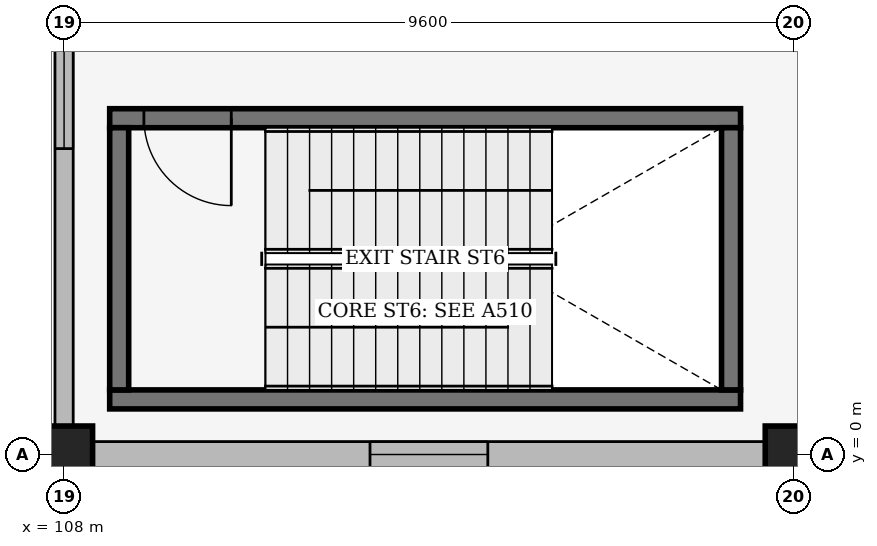
"""IFC4 building model, lengths in metres.
Left out: names, types, materials, properties, quantities, classifications, styles, units other than length and angle.
Written with IfcOpenShell. Run it as: python <this file> out.ifc"""

import sys

from ifc_helpers import new_model, si_unit, direction, frame, frame_2d, origin, origin_2d, place, context, subcontext, project, spatial, rectangle, extrude, element, fill, save


model = new_model("IFC4")
c1 = context("Model", 3, precision=1e-05, world=origin(), true_north=direction((0.0, 1.0)))
c2 = subcontext(c1, "Body", "Model", "MODEL_VIEW")
j1 = project(units=[si_unit("LENGTHUNIT", "METRE"), si_unit("PLANEANGLEUNIT", "RADIAN")], contexts=[c1])
p1 = place(None, origin())
s1 = spatial("IfcSite", under=j1, at=p1, CompositionType="ELEMENT")
p2 = place(p1, origin())
s2 = spatial("IfcBuilding", under=s1, at=p2, CompositionType="ELEMENT")
p3 = place(p2, frame((0.0, 0.0, 5.4)))
s3 = spatial("IfcBuildingStorey", under=s2, at=p3, CompositionType="ELEMENT", Elevation=5.4)
for number, where, z_axis, x_axis in (
    (1, (108.0, 0.0, 0.0), (0.0, 0.0, 1.0), (1.0, 0.0, 0.0)),
    (2, (117.6, 0.0, 0.0), (0.0, 0.0, 1.0), (1.0, 0.0, 0.0)),
):
    element("IfcColumn", number, at=place(p3, frame(where, z_axis=z_axis, x_axis=x_axis)), inside=s3, PredefinedType="COLUMN", context=c2, shape_type="SweptSolid", body=[
        extrude(rectangle(XDim=0.75, YDim=0.75, at=origin_2d()), origin(), (0.0, 0.0, 1.0), 5.1),
    ])
p4 = place(p3, frame((108.0, 9.217, 0.0), z_axis=(0.0, 0.0, 1.0), x_axis=(0.0, -1.0, 0.0)))
e3 = element("IfcWall", 3, at=p4, inside=s3, PredefinedType="SOLIDWALL", context=c2, shape_type="SweptSolid", body=[
    extrude(rectangle(XDim=8.834, YDim=0.24, at=frame_2d((4.417, 0.0))), origin(), (0.0, 0.0, 1.0), 4.406),
])
p5 = place(p4, frame((3.642, 0.0, 0.95)))
e4 = element("IfcOpeningElement", 4, at=p5, cuts=e3, PredefinedType="OPENING", context=c2, shape_type="SweptSolid", body=[
    extrude(rectangle(XDim=1.55, YDim=1.8, at=frame_2d((0.775, 0.9))), frame((0.0, 0.13, 0.0), z_axis=(0.0, -1.0, 0.0), x_axis=(1.0, 0.0, 0.0)), (0.0, 0.0, 1.0), 0.26),
])
p6 = place(p3, frame((108.383, 0.0, 0.0), z_axis=(0.0, 0.0, 1.0), x_axis=(1.0, 0.0, 0.0)))
e5 = element("IfcWall", 5, at=p6, inside=s3, PredefinedType="SOLIDWALL", context=c2, shape_type="SweptSolid", body=[
    extrude(rectangle(XDim=8.834, YDim=0.34, at=frame_2d((4.417, 0.0))), origin(), (0.0, 0.0, 1.0), 4.408),
])
p7 = place(p6, frame((3.642, 0.0, 0.95)))
e6 = element("IfcOpeningElement", 6, at=p7, cuts=e5, PredefinedType="OPENING", context=c2, shape_type="SweptSolid", body=[
    extrude(rectangle(XDim=1.55, YDim=2.1, at=frame_2d((0.775, 1.05))), frame((0.0, 0.18, 0.0), z_axis=(0.0, -1.0, 0.0), x_axis=(1.0, 0.0, 0.0)), (0.0, 0.0, 1.0), 0.36),
])
p8 = place(p3, frame((108.6, 0.725, 0.0), z_axis=(0.0, 0.0, 1.0), x_axis=(1.0, 0.0, 0.0)))
e7 = element("IfcWall", 7, at=p8, inside=s3, PredefinedType="SHEAR", context=c2, shape_type="SweptSolid", body=[
    extrude(rectangle(XDim=8.3, YDim=0.25, at=frame_2d((4.15, 0.0))), origin(), (0.0, 0.0, 1.0), 4.75),
])
p9 = place(p3, frame((116.9, 4.425, 0.0), z_axis=(0.0, 0.0, 1.0), x_axis=(-1.0, 0.0, 0.0)))
e8 = element("IfcWall", 8, at=p9, inside=s3, PredefinedType="SHEAR", context=c2, shape_type="SweptSolid", body=[
    extrude(rectangle(XDim=8.3, YDim=0.25, at=frame_2d((4.15, 0.0))), origin(), (0.0, 0.0, 1.0), 4.75),
])
p10 = place(p9, frame((7.85, 0.0, 0.0), z_axis=(0.0, 0.0, 1.0), x_axis=(-1.0, 0.0, 0.0)))
e9 = element("IfcOpeningElement", 9, at=p10, cuts=e8, PredefinedType="OPENING", context=c2, shape_type="SweptSolid", body=[
    extrude(rectangle(XDim=1.15, YDim=2.2, at=frame_2d((0.575, 1.1))), frame((0.0, 0.135, 0.0), z_axis=(0.0, -1.0, 0.0), x_axis=(1.0, 0.0, 0.0)), (0.0, 0.0, 1.0), 0.27),
])
for number, where, z_axis, x_axis in (
    (10, (108.725, 4.3, 0.0), (0.0, 0.0, 1.0), (0.0, -1.0, 0.0)),
    (11, (116.775, 0.85, 0.0), (0.0, 0.0, 1.0), (0.0, 1.0, 0.0)),
):
    element("IfcWall", number, at=place(p3, frame(where, z_axis=z_axis, x_axis=x_axis)), inside=s3, PredefinedType="SHEAR", context=c2, shape_type="SweptSolid", body=[
        extrude(rectangle(XDim=3.45, YDim=0.25, at=frame_2d((1.725, 0.0))), origin(), (0.0, 0.0, 1.0), 4.75),
    ])
p11 = place(p5, origin())
e12 = element("IfcWindow", 12, at=p11, inside=s3, PartitioningType="SINGLE_PANEL", PredefinedType="WINDOW", context=c2, shape_type="SweptSolid", body=[
    extrude(rectangle(XDim=1.55, YDim=1.8, at=frame_2d((0.775, 0.9))), frame((0.0, 0.03, 0.0), z_axis=(0.0, -1.0, 0.0), x_axis=(1.0, 0.0, 0.0)), (0.0, 0.0, 1.0), 0.06),
])
fill(e4, e12)
p12 = place(p7, origin())
e13 = element("IfcWindow", 13, at=p12, inside=s3, PartitioningType="SINGLE_PANEL", PredefinedType="WINDOW", context=c2, shape_type="SweptSolid", body=[
    extrude(rectangle(XDim=1.55, YDim=2.1, at=frame_2d((0.775, 1.05))), frame((0.0, 0.03, 0.0), z_axis=(0.0, -1.0, 0.0), x_axis=(1.0, 0.0, 0.0)), (0.0, 0.0, 1.0), 0.06),
])
fill(e6, e13)
p13 = place(p10, origin())
e14 = element("IfcDoor", 14, at=p13, inside=s3, OperationType="SINGLE_SWING_RIGHT", PredefinedType="DOOR", context=c2, shape_type="SweptSolid", body=[
    extrude(rectangle(XDim=1.15, YDim=2.2, at=frame_2d((0.575, 1.1))), frame((0.0, 0.025, 0.0), z_axis=(0.0, -1.0, 0.0), x_axis=(1.0, 0.0, 0.0)), (0.0, 0.0, 1.0), 0.05),
])
fill(e9, e14)
save(model, sys.argv[1])
